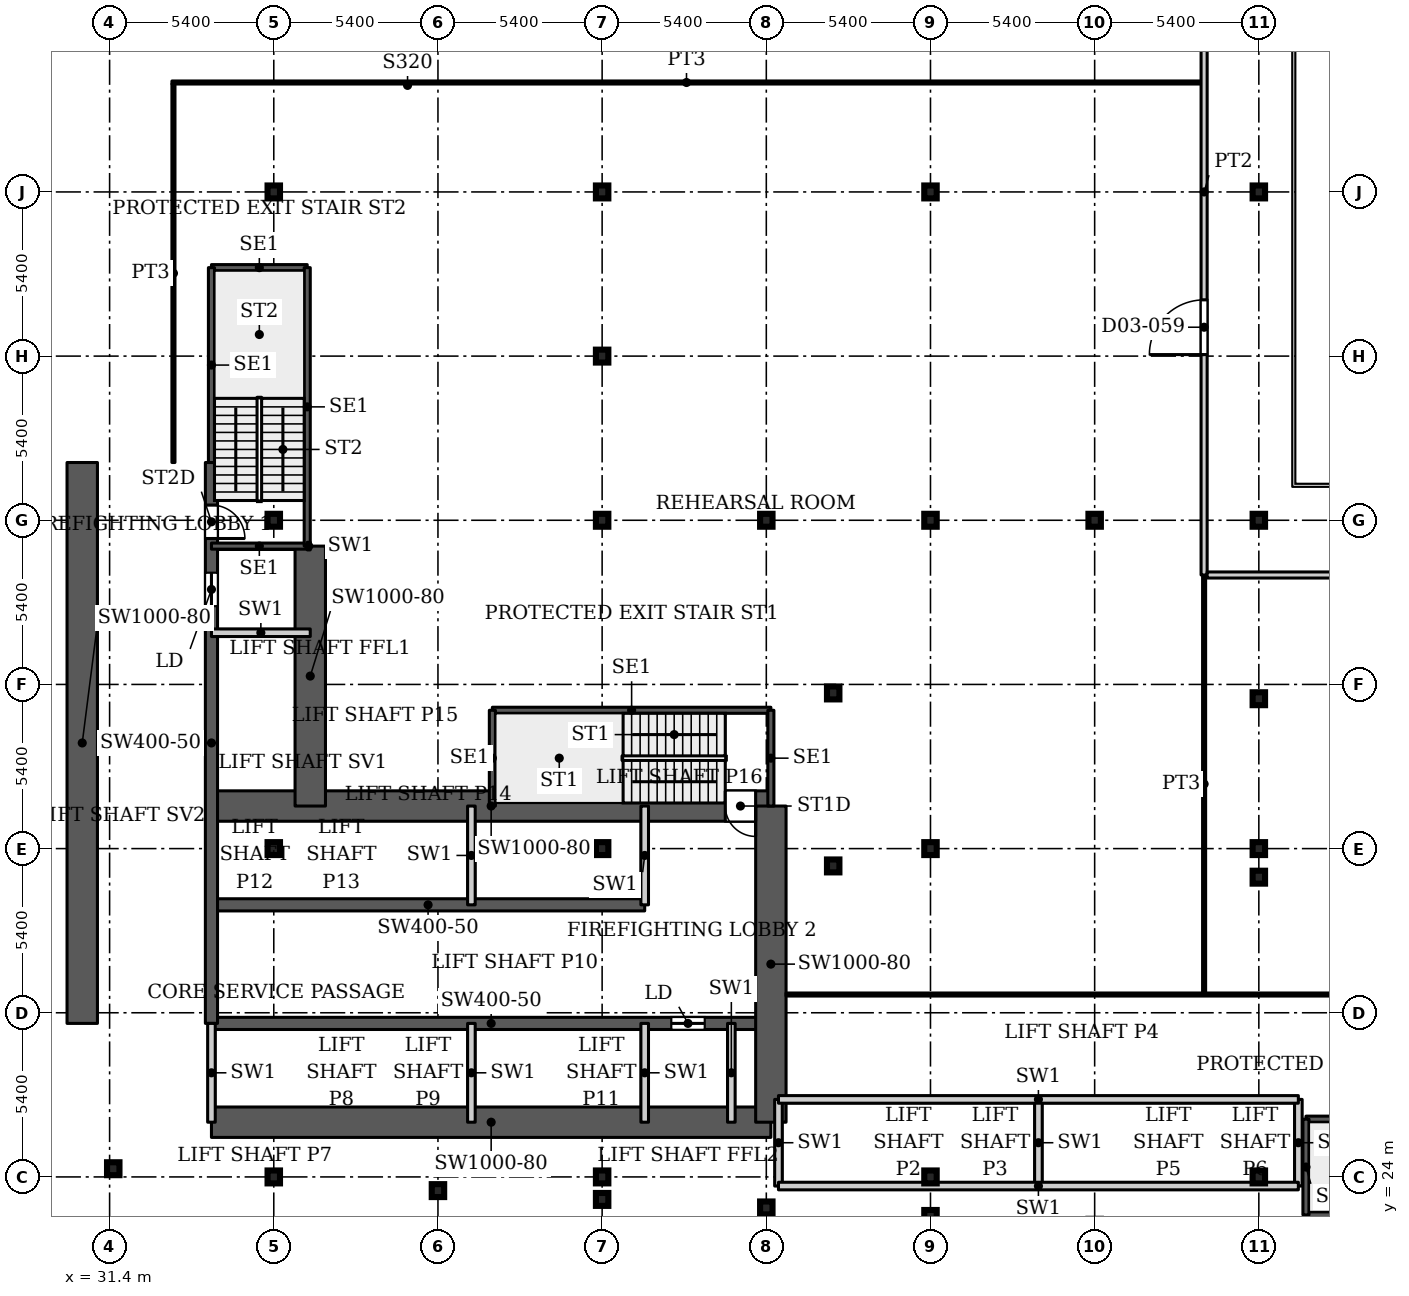
"""IFC4 building model, lengths in metres.
Left out: names, types, materials, properties, quantities, classifications, styles, units other than length and angle.
Written with IfcOpenShell. Run it as: python <this file> out.ifc"""

import sys

from ifc_helpers import new_model, si_unit, direction, frame, frame_2d, origin, origin_2d, place, context, subcontext, project, spatial, rectangle, i_section, extrude, source, transform, mapped, element, fill, save


model = new_model("IFC4")
c1 = context("Model", 3, precision=1e-05, world=origin(), true_north=direction((0.0, 1.0)))
c2 = subcontext(c1, "Body", "Model", "MODEL_VIEW")
j1 = project(units=[si_unit("LENGTHUNIT", "METRE"), si_unit("PLANEANGLEUNIT", "RADIAN")], contexts=[c1])
p1 = place(None, origin())
s1 = spatial("IfcSite", under=j1, at=p1, CompositionType="ELEMENT")
p2 = place(p1, origin())
s2 = spatial("IfcBuilding", under=s1, at=p2, CompositionType="ELEMENT")
p3 = place(p2, frame((0.0, 0.0, 17.0)))
s3 = spatial("IfcBuildingStorey", under=s2, at=p3, CompositionType="ELEMENT", Elevation=17.0)
for number, where, z_axis, x_axis in (
    (1, (36.8, 24.0, 0.0), (0.0, 0.0, 1.0), (1.0, 0.0, 0.0)),
    (2, (47.6, 24.0, 0.0), (0.0, 0.0, 1.0), (1.0, 0.0, 0.0)),
    (3, (58.4, 24.0, 0.0), (0.0, 0.0, 1.0), (1.0, 0.0, 0.0)),
    (4, (69.2, 24.0, 0.0), (0.0, 0.0, 1.0), (1.0, 0.0, 0.0)),
    (5, (36.8, 34.8, 0.0), (0.0, 0.0, 1.0), (1.0, 0.0, 0.0)),
    (6, (47.6, 34.8, 0.0), (0.0, 0.0, 1.0), (1.0, 0.0, 0.0)),
    (7, (58.4, 34.8, 0.0), (0.0, 0.0, 1.0), (1.0, 0.0, 0.0)),
    (8, (69.2, 34.8, 0.0), (0.0, 0.0, 1.0), (1.0, 0.0, 0.0)),
    (9, (36.8, 45.6, 0.0), (0.0, 0.0, 1.0), (1.0, 0.0, 0.0)),
    (10, (47.6, 45.6, 0.0), (0.0, 0.0, 1.0), (1.0, 0.0, 0.0)),
    (11, (58.4, 45.6, 0.0), (0.0, 0.0, 1.0), (1.0, 0.0, 0.0)),
    (12, (69.2, 45.6, 0.0), (0.0, 0.0, 1.0), (1.0, 0.0, 0.0)),
    (13, (36.8, 56.4, 0.0), (0.0, 0.0, 1.0), (1.0, 0.0, 0.0)),
    (14, (47.6, 56.4, 0.0), (0.0, 0.0, 1.0), (1.0, 0.0, 0.0)),
    (15, (58.4, 56.4, 0.0), (0.0, 0.0, 1.0), (1.0, 0.0, 0.0)),
    (16, (69.2, 56.4, 0.0), (0.0, 0.0, 1.0), (1.0, 0.0, 0.0)),
    (17, (58.4, 22.7, 0.0), (0.0, 0.0, 1.0), (1.0, 0.0, 0.0)),
    (18, (53.0, 22.98, 0.0), (0.0, 0.0, 1.0), (1.0, 0.0, 0.0)),
    (19, (47.6, 23.26, 0.0), (0.0, 0.0, 1.0), (1.0, 0.0, 0.0)),
    (20, (42.2, 23.55, 0.0), (0.0, 0.0, 1.0), (1.0, 0.0, 0.0)),
    (21, (31.52, 24.27, 0.0), (0.0, 0.0, 1.0), (1.0, 0.0, 0.0)),
    (22, (53.0, 45.6, 0.0), (0.0, 0.0, 1.0), (1.0, 0.0, 0.0)),
    (23, (63.8, 45.6, 0.0), (0.0, 0.0, 1.0), (1.0, 0.0, 0.0)),
    (24, (47.6, 51.0, 0.0), (0.0, 0.0, 1.0), (1.0, 0.0, 0.0)),
    (25, (69.2, 33.86, 0.0), (0.0, 0.0, 1.0), (1.0, 0.0, 0.0)),
    (26, (55.2, 34.23, 0.0), (0.0, 0.0, 1.0), (1.0, 0.0, 0.0)),
    (27, (69.2, 39.73, 0.0), (0.0, 0.0, 1.0), (1.0, 0.0, 0.0)),
    (28, (55.2, 39.92, 0.0), (0.0, 0.0, 1.0), (1.0, 0.0, 0.0)),
):
    element("IfcColumn", number, at=place(p3, frame(where, z_axis=z_axis, x_axis=x_axis)), inside=s3, PredefinedType="COLUMN", context=c2, shape_type="SweptSolid", body=[
        extrude(i_section(OverallWidth=0.409, OverallDepth=0.425, WebThickness=0.033, FlangeThickness=0.052, FilletRadius=0.013, at=origin_2d()), origin(), (0.0, 0.0, 1.0), 4.5),
    ])
p4 = place(p3, frame((34.75, 25.8, 0.0), z_axis=(0.0, 0.0, 1.0), x_axis=(1.0, 0.0, 0.0)))
e29 = element("IfcWall", 29, at=p4, inside=s3, PredefinedType="SHEAR", context=c2, shape_type="SweptSolid", body=[
    extrude(rectangle(XDim=18.4, YDim=1.0, at=frame_2d((9.2, 0.0))), origin(), (0.0, 0.0, 1.0), 4.5),
])
p5 = place(p3, frame((34.75, 29.05, 0.0), z_axis=(0.0, 0.0, 1.0), x_axis=(1.0, 0.0, 0.0)))
e30 = element("IfcWall", 30, at=p5, inside=s3, PredefinedType="SHEAR", context=c2, shape_type="SweptSolid", body=[
    extrude(rectangle(XDim=18.4, YDim=0.4, at=frame_2d((9.2, 0.0))), origin(), (0.0, 0.0, 1.0), 4.5),
])
p6 = place(p5, frame((15.125, 0.0, 0.0)))
e31 = element("IfcOpeningElement", 31, at=p6, cuts=e30, PredefinedType="OPENING", context=c2, shape_type="SweptSolid", body=[
    extrude(rectangle(XDim=1.1, YDim=2.2, at=frame_2d((0.55, 1.1))), frame((0.0, 0.21, 0.0), z_axis=(0.0, -1.0, 0.0), x_axis=(1.0, 0.0, 0.0)), (0.0, 0.0, 1.0), 0.42),
])
p7 = place(p3, frame((34.75, 32.95, 0.0), z_axis=(0.0, 0.0, 1.0), x_axis=(1.0, 0.0, 0.0)))
e32 = element("IfcWall", 32, at=p7, inside=s3, PredefinedType="SHEAR", context=c2, shape_type="SweptSolid", body=[
    extrude(rectangle(XDim=14.25, YDim=0.4, at=frame_2d((7.125, 0.0))), origin(), (0.0, 0.0, 1.0), 4.5),
])
p8 = place(p3, frame((34.75, 36.2, 0.0), z_axis=(0.0, 0.0, 1.0), x_axis=(1.0, 0.0, 0.0)))
e33 = element("IfcWall", 33, at=p8, inside=s3, PredefinedType="SHEAR", context=c2, shape_type="SweptSolid", body=[
    extrude(rectangle(XDim=18.4, YDim=1.0, at=frame_2d((9.2, 0.0))), origin(), (0.0, 0.0, 1.0), 4.5),
])
p9 = place(p8, frame((16.9, 0.0, 0.0)))
e34 = element("IfcOpeningElement", 34, at=p9, cuts=e33, PredefinedType="OPENING", context=c2, shape_type="SweptSolid", body=[
    extrude(rectangle(XDim=1.0, YDim=2.2, at=frame_2d((0.5, 1.1))), frame((0.0, 0.51, 0.0), z_axis=(0.0, -1.0, 0.0), x_axis=(1.0, 0.0, 0.0)), (0.0, 0.0, 1.0), 1.02),
])
p10 = place(p3, frame((34.75, 29.05, 0.0), z_axis=(0.0, 0.0, 1.0), x_axis=(0.0, 1.0, 0.0)))
e35 = element("IfcWall", 35, at=p10, inside=s3, PredefinedType="SHEAR", context=c2, shape_type="SweptSolid", body=[
    extrude(rectangle(XDim=18.45, YDim=0.4, at=frame_2d((9.225, 0.0))), origin(), (0.0, 0.0, 1.0), 4.5),
])
p11 = place(p10, frame((13.725, 0.0, 0.0)))
e36 = element("IfcOpeningElement", 36, at=p11, cuts=e35, PredefinedType="OPENING", context=c2, shape_type="SweptSolid", body=[
    extrude(rectangle(XDim=1.1, YDim=2.2, at=frame_2d((0.55, 1.1))), frame((0.0, 0.21, 0.0), z_axis=(0.0, -1.0, 0.0), x_axis=(1.0, 0.0, 0.0)), (0.0, 0.0, 1.0), 0.42),
])
p12 = place(p10, frame((15.95, 0.0, 0.0)))
e37 = element("IfcOpeningElement", 37, at=p12, cuts=e35, PredefinedType="OPENING", context=c2, shape_type="SweptSolid", body=[
    extrude(rectangle(XDim=1.1, YDim=2.2, at=frame_2d((0.55, 1.1))), frame((0.0, 0.21, 0.0), z_axis=(0.0, -1.0, 0.0), x_axis=(1.0, 0.0, 0.0)), (0.0, 0.0, 1.0), 0.42),
])
p13 = place(p3, frame((38.0, 36.2, 0.0), z_axis=(0.0, 0.0, 1.0), x_axis=(0.0, 1.0, 0.0)))
e38 = element("IfcWall", 38, at=p13, inside=s3, PredefinedType="SHEAR", context=c2, shape_type="SweptSolid", body=[
    extrude(rectangle(XDim=8.55, YDim=1.0, at=frame_2d((4.275, 0.0))), origin(), (0.0, 0.0, 1.0), 4.5),
])
p14 = place(p3, frame((30.5, 29.05, 0.0), z_axis=(0.0, 0.0, 1.0), x_axis=(0.0, 1.0, 0.0)))
e39 = element("IfcWall", 39, at=p14, inside=s3, PredefinedType="SHEAR", context=c2, shape_type="SweptSolid", body=[
    extrude(rectangle(XDim=18.45, YDim=1.0, at=frame_2d((9.225, 0.0))), origin(), (0.0, 0.0, 1.0), 4.5),
])
p15 = place(p3, frame((53.15, 25.8, 0.0), z_axis=(0.0, 0.0, 1.0), x_axis=(0.0, 1.0, 0.0)))
e40 = element("IfcWall", 40, at=p15, inside=s3, PredefinedType="SHEAR", context=c2, shape_type="SweptSolid", body=[
    extrude(rectangle(XDim=10.4, YDim=1.0, at=frame_2d((5.2, 0.0))), origin(), (0.0, 0.0, 1.0), 4.5),
])
p16 = place(p3, frame((43.99, 39.35, 0.0), z_axis=(0.0, 0.0, 1.0), x_axis=(1.0, 0.0, 0.0)))
e41 = element("IfcWall", 41, at=p16, inside=s3, PredefinedType="SHEAR", context=c2, shape_type="SweptSolid", body=[
    extrude(rectangle(XDim=9.16, YDim=0.2, at=frame_2d((4.58, 0.0))), origin(), (0.0, 0.0, 1.0), 4.5),
])
for number, where, z_axis, x_axis in (
    (42, (43.99, 36.2, 0.0), (0.0, 0.0, 1.0), (0.0, 1.0, 0.0)),
    (43, (53.15, 36.2, 0.0), (0.0, 0.0, 1.0), (0.0, 1.0, 0.0)),
):
    element("IfcWall", number, at=place(p3, frame(where, z_axis=z_axis, x_axis=x_axis)), inside=s3, PredefinedType="SHEAR", context=c2, shape_type="SweptSolid", body=[
        extrude(rectangle(XDim=3.15, YDim=0.2, at=frame_2d((1.575, 0.0))), origin(), (0.0, 0.0, 1.0), 4.5),
    ])
for number, where, z_axis, x_axis in (
    (44, (34.75, 44.75, 0.0), (0.0, 0.0, 1.0), (1.0, 0.0, 0.0)),
    (45, (34.75, 53.91, 0.0), (0.0, 0.0, 1.0), (1.0, 0.0, 0.0)),
):
    element("IfcWall", number, at=place(p3, frame(where, z_axis=z_axis, x_axis=x_axis)), inside=s3, PredefinedType="SHEAR", context=c2, shape_type="SweptSolid", body=[
        extrude(rectangle(XDim=3.15, YDim=0.2, at=frame_2d((1.575, 0.0))), origin(), (0.0, 0.0, 1.0), 4.5),
    ])
p17 = place(p3, frame((34.75, 47.5, 0.0), z_axis=(0.0, 0.0, 1.0), x_axis=(0.0, 1.0, 0.0)))
e46 = element("IfcWall", 46, at=p17, inside=s3, PredefinedType="SHEAR", context=c2, shape_type="SweptSolid", body=[
    extrude(rectangle(XDim=6.41, YDim=0.2, at=frame_2d((3.205, 0.0))), origin(), (0.0, 0.0, 1.0), 4.5),
])
for number, where, z_axis, x_axis in (
    (47, (37.9, 44.75, 0.0), (0.0, 0.0, 1.0), (0.0, 1.0, 0.0)),
    (48, (70.75, 22.75, 0.0), (0.0, 0.0, 1.0), (1.0, 0.0, 0.0)),
    (49, (70.75, 25.9, 0.0), (0.0, 0.0, 1.0), (1.0, 0.0, 0.0)),
):
    element("IfcWall", number, at=place(p3, frame(where, z_axis=z_axis, x_axis=x_axis)), inside=s3, PredefinedType="SHEAR", context=c2, shape_type="SweptSolid", body=[
        extrude(rectangle(XDim=9.16, YDim=0.2, at=frame_2d((4.58, 0.0))), origin(), (0.0, 0.0, 1.0), 4.5),
    ])
p18 = place(p3, frame((70.75, 22.75, 0.0), z_axis=(0.0, 0.0, 1.0), x_axis=(0.0, 1.0, 0.0)))
e50 = element("IfcWall", 50, at=p18, inside=s3, PredefinedType="SHEAR", context=c2, shape_type="SweptSolid", body=[
    extrude(rectangle(XDim=3.15, YDim=0.2, at=frame_2d((1.575, 0.0))), origin(), (0.0, 0.0, 1.0), 4.5),
])
for number, where, z_axis, x_axis in (
    (51, (34.75, 25.8, 0.0), (0.0, 0.0, 1.0), (0.0, 1.0, 0.0)),
    (52, (43.3, 25.8, 0.0), (0.0, 0.0, 1.0), (0.0, 1.0, 0.0)),
    (53, (43.3, 32.95, 0.0), (0.0, 0.0, 1.0), (0.0, 1.0, 0.0)),
    (54, (49.0, 25.8, 0.0), (0.0, 0.0, 1.0), (0.0, 1.0, 0.0)),
    (55, (49.0, 32.95, 0.0), (0.0, 0.0, 1.0), (0.0, 1.0, 0.0)),
    (56, (51.85, 25.8, 0.0), (0.0, 0.0, 1.0), (0.0, 1.0, 0.0)),
):
    element("IfcWall", number, at=place(p3, frame(where, z_axis=z_axis, x_axis=x_axis)), inside=s3, PredefinedType="PARTITIONING", context=c2, shape_type="SweptSolid", body=[
        extrude(rectangle(XDim=3.25, YDim=0.25, at=frame_2d((1.625, 0.0))), origin(), (0.0, 0.0, 1.0), 4.5),
    ])
for number, where, z_axis, x_axis in (
    (57, (53.4, 23.7, 0.0), (0.0, 0.0, 1.0), (0.0, 1.0, 0.0)),
    (58, (61.95, 23.7, 0.0), (0.0, 0.0, 1.0), (0.0, 1.0, 0.0)),
    (59, (70.5, 23.7, 0.0), (0.0, 0.0, 1.0), (0.0, 1.0, 0.0)),
):
    element("IfcWall", number, at=place(p3, frame(where, z_axis=z_axis, x_axis=x_axis)), inside=s3, PredefinedType="PARTITIONING", context=c2, shape_type="SweptSolid", body=[
        extrude(rectangle(XDim=2.85, YDim=0.25, at=frame_2d((1.425, 0.0))), origin(), (0.0, 0.0, 1.0), 4.5),
    ])
for number, where, z_axis, x_axis in (
    (60, (53.4, 23.7, 0.0), (0.0, 0.0, 1.0), (1.0, 0.0, 0.0)),
    (61, (53.4, 26.55, 0.0), (0.0, 0.0, 1.0), (1.0, 0.0, 0.0)),
):
    element("IfcWall", number, at=place(p3, frame(where, z_axis=z_axis, x_axis=x_axis)), inside=s3, PredefinedType="PARTITIONING", context=c2, shape_type="SweptSolid", body=[
        extrude(rectangle(XDim=17.1, YDim=0.25, at=frame_2d((8.55, 0.0))), origin(), (0.0, 0.0, 1.0), 4.5),
    ])
p19 = place(p3, frame((34.75, 41.9, 0.0), z_axis=(0.0, 0.0, 1.0), x_axis=(1.0, 0.0, 0.0)))
e62 = element("IfcWall", 62, at=p19, inside=s3, PredefinedType="PARTITIONING", context=c2, shape_type="SweptSolid", body=[
    extrude(rectangle(XDim=3.25, YDim=0.25, at=frame_2d((1.625, 0.0))), origin(), (0.0, 0.0, 1.0), 4.5),
])
p20 = place(p3, frame((37.9, 44.75, 0.0), z_axis=(0.0, 0.0, 1.0), x_axis=(1.0, 0.0, 0.0)))
e63 = element("IfcWall", 63, at=p20, inside=s3, PredefinedType="PARTITIONING", context=c2, shape_type="SweptSolid", body=[
    extrude(rectangle(XDim=0.1, YDim=0.25, at=frame_2d((0.05, 0.0))), origin(), (0.0, 0.0, 1.0), 4.5),
])
p21 = place(p3, frame((33.45, 60.0, 0.0), z_axis=(0.0, 0.0, 1.0), x_axis=(1.0, 0.0, 0.0)))
e64 = element("IfcWall", 64, at=p21, inside=s3, PredefinedType="PARTITIONING", context=c2, shape_type="SweptSolid", body=[
    extrude(rectangle(XDim=33.85, YDim=0.1, at=frame_2d((16.925, 0.0))), origin(), (0.0, 0.0, 1.0), 4.18),
])
p22 = place(p3, frame((33.5, 47.5, 0.0), z_axis=(0.0, 0.0, 1.0), x_axis=(0.0, 1.0, 0.0)))
e65 = element("IfcWall", 65, at=p22, inside=s3, PredefinedType="PARTITIONING", context=c2, shape_type="SweptSolid", body=[
    extrude(rectangle(XDim=12.45, YDim=0.1, at=frame_2d((6.225, 0.0))), origin(), (0.0, 0.0, 1.0), 4.18),
])
p23 = place(p3, frame((53.649, 30.0, 0.0), z_axis=(0.0, 0.0, 1.0), x_axis=(1.0, 0.0, 0.0)))
e66 = element("IfcWall", 66, at=p23, inside=s3, PredefinedType="PARTITIONING", context=c2, shape_type="SweptSolid", body=[
    extrude(rectangle(XDim=38.301, YDim=0.1, at=frame_2d((19.15, 0.0))), origin(), (0.0, 0.0, 1.0), 4.18),
])
p24 = place(p3, frame((67.4, 30.05, 0.0), z_axis=(0.0, 0.0, 1.0), x_axis=(0.0, 1.0, 0.0)))
e67 = element("IfcWall", 67, at=p24, inside=s3, PredefinedType="PARTITIONING", context=c2, shape_type="SweptSolid", body=[
    extrude(rectangle(XDim=13.75, YDim=0.1, at=frame_2d((6.875, 0.0))), origin(), (0.0, 0.0, 1.0), 4.18),
])
p25 = place(p3, frame((67.4, 43.8, 0.0), z_axis=(0.0, 0.0, 1.0), x_axis=(0.0, 1.0, 0.0)))
e68 = element("IfcWall", 68, at=p25, inside=s3, PredefinedType="PARTITIONING", context=c2, shape_type="SweptSolid", body=[
    extrude(rectangle(XDim=25.2, YDim=0.2, at=frame_2d((12.6, 0.0))), origin(), (0.0, 0.0, 1.0), 4.18),
])
p26 = place(p25, frame((7.25, 0.0, 0.0)))
e69 = element("IfcOpeningElement", 69, at=p26, cuts=e68, PredefinedType="OPENING", context=c2, shape_type="SweptSolid", body=[
    extrude(rectangle(XDim=1.8, YDim=2.1, at=frame_2d((0.9, 1.05))), frame((0.0, 0.11, 0.0), z_axis=(0.0, -1.0, 0.0), x_axis=(1.0, 0.0, 0.0)), (0.0, 0.0, 1.0), 0.22),
])
p27 = place(p25, frame((19.75, 0.0, 0.0)))
e70 = element("IfcOpeningElement", 70, at=p27, cuts=e68, PredefinedType="OPENING", context=c2, shape_type="SweptSolid", body=[
    extrude(rectangle(XDim=1.8, YDim=2.1, at=frame_2d((0.9, 1.05))), frame((0.0, 0.11, 0.0), z_axis=(0.0, -1.0, 0.0), x_axis=(1.0, 0.0, 0.0)), (0.0, 0.0, 1.0), 0.22),
])
p28 = place(p3, frame((67.5, 43.8, 0.0), z_axis=(0.0, 0.0, 1.0), x_axis=(1.0, 0.0, 0.0)))
e71 = element("IfcWall", 71, at=p28, inside=s3, PredefinedType="PARTITIONING", context=c2, shape_type="SweptSolid", body=[
    extrude(rectangle(XDim=24.4, YDim=0.2, at=frame_2d((12.2, 0.0))), origin(), (0.0, 0.0, 1.0), 4.18),
])
p29 = place(p28, frame((11.3, 0.0, 0.0)))
e72 = element("IfcOpeningElement", 72, at=p29, cuts=e71, PredefinedType="OPENING", context=c2, shape_type="SweptSolid", body=[
    extrude(rectangle(XDim=1.8, YDim=2.1, at=frame_2d((0.9, 1.05))), frame((0.0, 0.11, 0.0), z_axis=(0.0, -1.0, 0.0), x_axis=(1.0, 0.0, 0.0)), (0.0, 0.0, 1.0), 0.22),
])
m1 = source(origin(), c2, "Body", "SweptSolid", [
    extrude(rectangle(XDim=1.1, YDim=2.2, at=frame_2d((0.55, 1.1))), frame((0.0, 0.025, 0.0), z_axis=(0.0, -1.0, 0.0), x_axis=(1.0, 0.0, 0.0)), (0.0, 0.0, 1.0), 0.05),
])
p30 = place(p11, origin())
e73 = element("IfcDoor", 73, at=p30, inside=s3, OperationType="SLIDING_TO_LEFT", PredefinedType="DOOR", context=c2, shape_type="MappedRepresentation", body=[
    mapped(m1, transform((0.0, 0.0, 0.0), x_axis=(1.0, 0.0, 0.0), y_axis=(0.0, 1.0, 0.0), z_axis=(0.0, 0.0, 1.0), scale=1.0)),
])
fill(e36, e73)
p31 = place(p6, origin())
e74 = element("IfcDoor", 74, at=p31, inside=s3, OperationType="SLIDING_TO_LEFT", PredefinedType="DOOR", context=c2, shape_type="MappedRepresentation", body=[
    mapped(m1, transform((0.0, 0.0, 0.0), x_axis=(1.0, 0.0, 0.0), y_axis=(0.0, 1.0, 0.0), z_axis=(0.0, 0.0, 1.0), scale=1.0)),
])
fill(e31, e74)
m2 = source(origin(), c2, "Body", "SweptSolid", [
    extrude(rectangle(XDim=1.0, YDim=2.2, at=frame_2d((0.5, 1.1))), frame((0.0, 0.025, 0.0), z_axis=(0.0, -1.0, 0.0), x_axis=(1.0, 0.0, 0.0)), (0.0, 0.0, 1.0), 0.05),
])
p32 = place(p9, origin())
e75 = element("IfcDoor", 75, at=p32, inside=s3, OperationType="SINGLE_SWING_RIGHT", PredefinedType="DOOR", context=c2, shape_type="MappedRepresentation", body=[
    mapped(m2, transform((0.0, 0.0, 0.0), x_axis=(1.0, 0.0, 0.0), y_axis=(0.0, 1.0, 0.0), z_axis=(0.0, 0.0, 1.0), scale=1.0)),
])
fill(e34, e75)
m3 = source(origin(), c2, "Body", "SweptSolid", [
    extrude(rectangle(XDim=1.1, YDim=2.2, at=frame_2d((0.55, 1.1))), frame((0.0, 0.025, 0.0), z_axis=(0.0, -1.0, 0.0), x_axis=(1.0, 0.0, 0.0)), (0.0, 0.0, 1.0), 0.05),
])
p33 = place(p12, origin())
e76 = element("IfcDoor", 76, at=p33, inside=s3, OperationType="SINGLE_SWING_RIGHT", PredefinedType="DOOR", context=c2, shape_type="MappedRepresentation", body=[
    mapped(m3, transform((0.0, 0.0, 0.0), x_axis=(1.0, 0.0, 0.0), y_axis=(0.0, 1.0, 0.0), z_axis=(0.0, 0.0, 1.0), scale=1.0)),
])
fill(e37, e76)
m4 = source(origin(), c2, "Body", "SweptSolid", [
    extrude(rectangle(XDim=1.8, YDim=2.1, at=frame_2d((0.9, 1.05))), frame((0.0, 0.025, 0.0), z_axis=(0.0, -1.0, 0.0), x_axis=(1.0, 0.0, 0.0)), (0.0, 0.0, 1.0), 0.05),
])
p34 = place(p26, origin())
e77 = element("IfcDoor", 77, at=p34, inside=s3, OperationType="DOUBLE_DOOR_SINGLE_SWING", PredefinedType="DOOR", context=c2, shape_type="MappedRepresentation", body=[
    mapped(m4, transform((0.0, 0.0, 0.0), x_axis=(1.0, 0.0, 0.0), y_axis=(0.0, 1.0, 0.0), z_axis=(0.0, 0.0, 1.0), scale=1.0)),
])
fill(e69, e77)
save(model, sys.argv[1])
